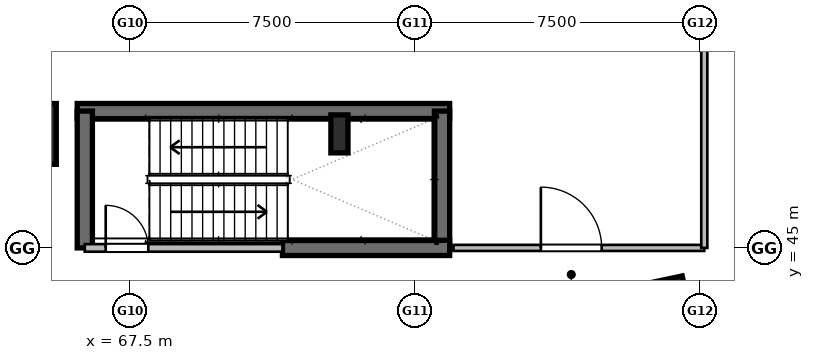
"""IFC4 building model, lengths in metres.
Left out: names, types, materials, properties, quantities, classifications, styles, units other than length and angle.
Written with IfcOpenShell. Run it as: python <this file> out.ifc"""

import sys

from ifc_helpers import new_model, si_unit, direction, frame, frame_2d, origin, origin_2d, place, context, subcontext, project, spatial, rectangle, hollow_rectangle, i_section, extrude, element, fill, save


model = new_model("IFC4")
c1 = context("Model", 3, precision=1e-05, world=origin(), true_north=direction((0.0, 1.0)))
c2 = subcontext(c1, "Body", "Model", "MODEL_VIEW")
j1 = project(units=[si_unit("LENGTHUNIT", "METRE"), si_unit("PLANEANGLEUNIT", "RADIAN")], contexts=[c1])
p1 = place(None, origin())
s1 = spatial("IfcSite", under=j1, at=p1, CompositionType="ELEMENT")
p2 = place(p1, origin())
s2 = spatial("IfcBuilding", under=s1, at=p2, CompositionType="ELEMENT")
p3 = place(p2, frame((0.0, 0.0, 20.4)))
s3 = spatial("IfcBuildingStorey", under=s2, at=p3, CompositionType="ELEMENT", Elevation=20.4)
for number, where, z_axis, x_axis in (
    (1, (64.75, 48.0, 0.0), (0.0, 0.0, 1.0), (1.0, 0.0, 0.0)),
    (2, (81.403, 43.313, 0.0), (0.0, 0.0, 1.0), (0.978, 0.208, 0.0)),
):
    element("IfcColumn", number, at=place(p3, frame(where, z_axis=z_axis, x_axis=x_axis)), inside=s3, PredefinedType="COLUMN", context=c2, shape_type="SweptSolid", body=[
        extrude(hollow_rectangle(XDim=1.6, YDim=1.6, WallThickness=0.04, at=origin_2d()), origin(), (0.0, 0.0, 1.0), 4.8),
    ])
p4 = place(p3, frame((73.0, 48.0, 0.0), z_axis=(0.0, 0.0, 1.0), x_axis=(1.0, 0.0, 0.0)))
e3 = element("IfcColumn", 3, at=p4, inside=s3, PredefinedType="COLUMN", context=c2, shape_type="SweptSolid", body=[
    extrude(i_section(OverallWidth=0.45, OverallDepth=1.0, WebThickness=0.022, FlangeThickness=0.04, at=origin_2d()), origin(), (0.0, 0.0, 1.0), 4.8),
])
p5 = place(p3, frame((66.1, 48.6, 0.0), z_axis=(0.0, 0.0, 1.0), x_axis=(1.0, 0.0, 0.0)))
e4 = element("IfcWall", 4, at=p5, inside=s3, PredefinedType="SHEAR", context=c2, shape_type="SweptSolid", body=[
    extrude(rectangle(XDim=9.8, YDim=0.4, at=frame_2d((4.9, 0.0))), origin(), (0.0, 0.0, 1.0), 4.8),
])
for number, where, z_axis, x_axis in (
    (5, (66.3, 45.0, 0.0), (0.0, 0.0, 1.0), (0.0, 1.0, 0.0)),
    (6, (75.7, 45.0, 0.0), (0.0, 0.0, 1.0), (0.0, 1.0, 0.0)),
):
    element("IfcWall", number, at=place(p3, frame(where, z_axis=z_axis, x_axis=x_axis)), inside=s3, PredefinedType="SHEAR", context=c2, shape_type="SweptSolid", body=[
        extrude(rectangle(XDim=3.6, YDim=0.4, at=frame_2d((1.8, 0.0))), origin(), (0.0, 0.0, 1.0), 4.8),
    ])
p6 = place(p3, frame((71.5, 45.0, 0.0), z_axis=(0.0, 0.0, 1.0), x_axis=(1.0, 0.0, 0.0)))
e7 = element("IfcWall", 7, at=p6, inside=s3, PredefinedType="SHEAR", context=c2, shape_type="SweptSolid", body=[
    extrude(rectangle(XDim=4.4, YDim=0.4, at=frame_2d((2.2, 0.0))), origin(), (0.0, 0.0, 1.0), 4.8),
])
p7 = place(p3, frame((66.3, 45.0, 0.0), z_axis=(0.0, 0.0, 1.0), x_axis=(1.0, 0.0, 0.0)))
e8 = element("IfcWall", 8, at=p7, inside=s3, PredefinedType="PARTITIONING", context=c2, shape_type="SweptSolid", body=[
    extrude(rectangle(XDim=5.2, YDim=0.2, at=frame_2d((2.6, 0.0))), origin(), (0.0, 0.0, 1.0), 4.43),
])
p8 = place(p7, frame((0.55, 0.0, 0.0)))
e9 = element("IfcOpeningElement", 9, at=p8, cuts=e8, PredefinedType="OPENING", context=c2, shape_type="SweptSolid", body=[
    extrude(rectangle(XDim=1.12, YDim=2.1, at=frame_2d((0.56, 1.05))), frame((0.0, 0.11, 0.0), z_axis=(0.0, -1.0, 0.0), x_axis=(1.0, 0.0, 0.0)), (0.0, 0.0, 1.0), 0.22),
])
p9 = place(p3, frame((76.0, 45.0, 0.0), z_axis=(0.0, 0.0, 1.0), x_axis=(1.0, 0.0, 0.0)))
e10 = element("IfcWall", 10, at=p9, inside=s3, PredefinedType="PARTITIONING", context=c2, shape_type="SweptSolid", body=[
    extrude(rectangle(XDim=6.6, YDim=0.16, at=frame_2d((3.3, 0.0))), origin(), (0.0, 0.0, 1.0), 4.43),
])
p10 = place(p9, frame((2.3, 0.0, 0.0)))
e11 = element("IfcOpeningElement", 11, at=p10, cuts=e10, PredefinedType="OPENING", context=c2, shape_type="SweptSolid", body=[
    extrude(rectangle(XDim=1.6, YDim=2.2, at=frame_2d((0.8, 1.1))), frame((0.0, 0.09, 0.0), z_axis=(0.0, -1.0, 0.0), x_axis=(1.0, 0.0, 0.0)), (0.0, 0.0, 1.0), 0.18),
])
p11 = place(p3, frame((82.6, 45.0, 0.0), z_axis=(0.0, 0.0, 1.0), x_axis=(0.0, 1.0, 0.0)))
e12 = element("IfcWall", 12, at=p11, inside=s3, PredefinedType="PARTITIONING", context=c2, shape_type="SweptSolid", body=[
    extrude(rectangle(XDim=5.35, YDim=0.16, at=frame_2d((2.675, 0.0))), origin(), (0.0, 0.0, 1.0), 4.43),
])
p12 = place(p8, origin())
e13 = element("IfcDoor", 13, at=p12, inside=s3, OperationType="SINGLE_SWING_LEFT", PredefinedType="DOOR", context=c2, shape_type="SweptSolid", body=[
    extrude(rectangle(XDim=1.12, YDim=2.1, at=frame_2d((0.56, 1.05))), frame((0.0, 0.025, 0.0), z_axis=(0.0, -1.0, 0.0), x_axis=(1.0, 0.0, 0.0)), (0.0, 0.0, 1.0), 0.05),
])
fill(e9, e13)
p13 = place(p10, origin())
e14 = element("IfcDoor", 14, at=p13, inside=s3, OperationType="DOUBLE_DOOR_SINGLE_SWING", PredefinedType="DOOR", context=c2, shape_type="SweptSolid", body=[
    extrude(rectangle(XDim=1.6, YDim=2.2, at=frame_2d((0.8, 1.1))), frame((0.0, 0.025, 0.0), z_axis=(0.0, -1.0, 0.0), x_axis=(1.0, 0.0, 0.0)), (0.0, 0.0, 1.0), 0.05),
])
fill(e11, e14)
save(model, sys.argv[1])
